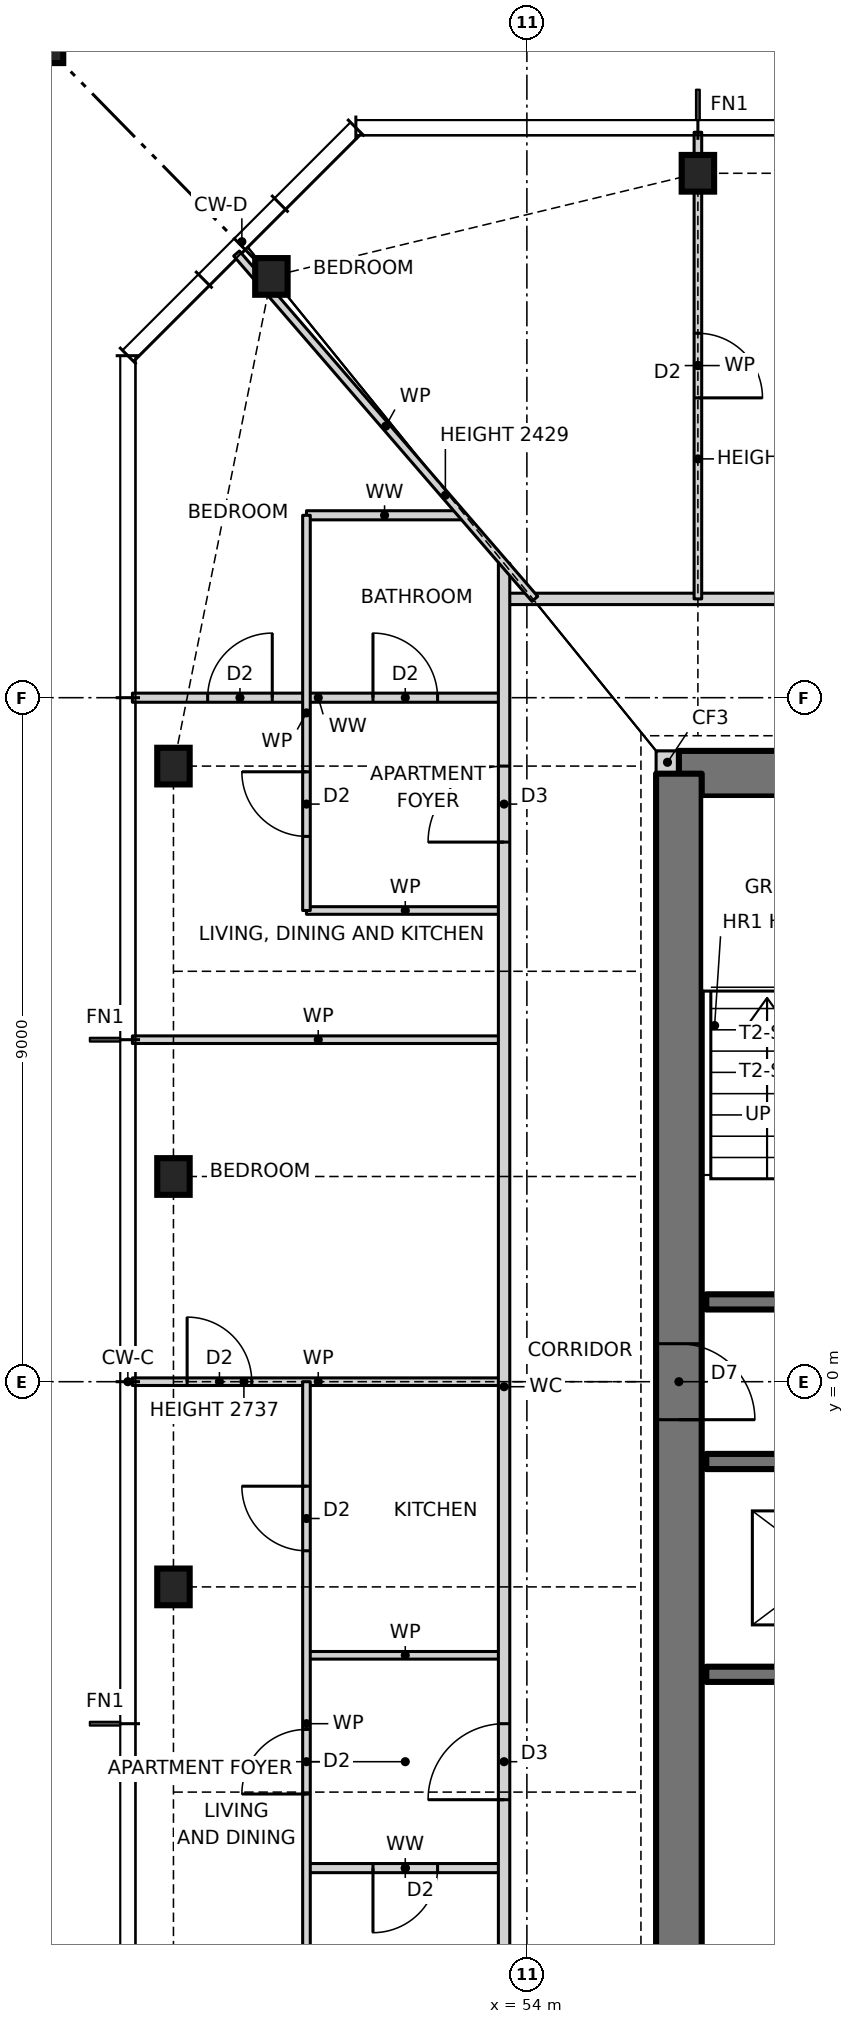
"""IFC4 building model, lengths in metres.
Left out: names, types, materials, properties, quantities, classifications, styles, units other than length and angle.
Written with IfcOpenShell. Run it as: python <this file> out.ifc"""

import sys

from ifc_helpers import new_model, si_unit, direction, frame, frame_2d, origin, origin_2d, place, context, subcontext, project, spatial, rectangle, hollow_rectangle, i_section, extrude, element, fill, save


model = new_model("IFC4")
c1 = context("Model", 3, precision=1e-05, world=origin(), true_north=direction((0.0, 1.0)))
c2 = subcontext(c1, "Body", "Model", "MODEL_VIEW")
j1 = project(units=[si_unit("LENGTHUNIT", "METRE"), si_unit("PLANEANGLEUNIT", "RADIAN")], contexts=[c1])
p1 = place(None, origin())
s1 = spatial("IfcSite", under=j1, at=p1, CompositionType="ELEMENT")
p2 = place(p1, origin())
s2 = spatial("IfcBuilding", under=s1, at=p2, CompositionType="ELEMENT")
p3 = place(p2, frame((0.0, 0.0, 84.0)))
s3 = spatial("IfcBuildingStorey", under=s2, at=p3, CompositionType="ELEMENT", Elevation=84.0)
for number, where, z_axis, x_axis in (
    (1, (56.25, 15.9, 0.0), (0.0, 0.0, 1.0), (1.0, 0.0, 0.0)),
    (2, (50.639, 14.543, 0.0), (0.0, 0.0, 1.0), (1.0, 0.0, 0.0)),
    (3, (49.35, 8.1, 0.0), (0.0, 0.0, 1.0), (1.0, 0.0, 0.0)),
    (4, (49.35, 2.7, 0.0), (0.0, 0.0, 1.0), (1.0, 0.0, 0.0)),
    (5, (49.35, -2.7, 0.0), (0.0, 0.0, 1.0), (1.0, 0.0, 0.0)),
):
    element("IfcColumn", number, at=place(p3, frame(where, z_axis=z_axis, x_axis=x_axis)), inside=s3, PredefinedType="COLUMN", context=c2, shape_type="SweptSolid", body=[
        extrude(i_section(OverallWidth=0.427, OverallDepth=0.483, WebThickness=0.051, FlangeThickness=0.082, at=origin_2d()), origin(), (0.0, 0.0, 1.0), 3.5),
    ])
p4 = place(p3, frame((47.35, 17.9, 0.0), z_axis=(0.0, 0.0, 1.0), x_axis=(1.0, 0.0, 0.0)))
e6 = element("IfcColumn", 6, at=p4, inside=s3, PredefinedType="COLUMN", context=c2, shape_type="SweptSolid", body=[
    extrude(hollow_rectangle(XDim=1.1, YDim=1.1, WallThickness=0.06, at=origin_2d()), origin(), (0.0, 0.0, 1.0), 3.5),
])
p5 = place(p3, frame((55.7, 8.15, 0.0), z_axis=(0.0, 0.0, 1.0), x_axis=(1.0, 0.0, 0.0)))
e7 = element("IfcWall", 7, at=p5, inside=s3, PredefinedType="SOLIDWALL", context=c2, shape_type="SweptSolid", body=[
    extrude(rectangle(XDim=0.3, YDim=0.3, at=frame_2d((0.15, 0.0))), origin(), (0.0, 0.0, 1.0), 3.5),
])
p6 = place(p3, frame((70.0, 8.0, 0.0), z_axis=(0.0, 0.0, 1.0), x_axis=(-1.0, 0.0, 0.0)))
e8 = element("IfcWall", 8, at=p6, inside=s3, PredefinedType="SHEAR", context=c2, shape_type="SweptSolid", body=[
    extrude(rectangle(XDim=14.0, YDim=0.6, at=frame_2d((7.0, 0.0))), origin(), (0.0, 0.0, 1.0), 3.5),
])
p7 = place(p6, frame((8.2, 0.0, 0.0)))
e9 = element("IfcOpeningElement", 9, at=p7, cuts=e8, PredefinedType="OPENING", context=c2, shape_type="SweptSolid", body=[
    extrude(rectangle(XDim=0.9, YDim=2.1, at=frame_2d((0.45, 1.05))), frame((0.0, 0.31, 0.0), z_axis=(0.0, -1.0, 0.0), x_axis=(1.0, 0.0, 0.0)), (0.0, 0.0, 1.0), 0.62),
])
p8 = place(p6, frame((3.2, 0.0, 0.0)))
e10 = element("IfcOpeningElement", 10, at=p8, cuts=e8, PredefinedType="OPENING", context=c2, shape_type="SweptSolid", body=[
    extrude(rectangle(XDim=0.9, YDim=2.1, at=frame_2d((0.45, 1.05))), frame((0.0, 0.31, 0.0), z_axis=(0.0, -1.0, 0.0), x_axis=(1.0, 0.0, 0.0)), (0.0, 0.0, 1.0), 0.62),
])
p9 = place(p3, frame((56.0, 8.0, 0.0), z_axis=(0.0, 0.0, 1.0), x_axis=(0.0, -1.0, 0.0)))
e11 = element("IfcWall", 11, at=p9, inside=s3, PredefinedType="SHEAR", context=c2, shape_type="SweptSolid", body=[
    extrude(rectangle(XDim=16.0, YDim=0.6, at=frame_2d((8.0, 0.0))), origin(), (0.0, 0.0, 1.0), 3.5),
])
p10 = place(p9, frame((7.5, 0.0, 0.0)))
e12 = element("IfcOpeningElement", 12, at=p10, cuts=e11, PredefinedType="OPENING", context=c2, shape_type="SweptSolid", body=[
    extrude(rectangle(XDim=1.0, YDim=2.1, at=frame_2d((0.5, 1.05))), frame((0.0, 0.31, 0.0), z_axis=(0.0, -1.0, 0.0), x_axis=(1.0, 0.0, 0.0)), (0.0, 0.0, 1.0), 0.62),
])
p11 = place(p3, frame((51.1, -6.4, 0.0), z_axis=(0.0, 0.0, 1.0), x_axis=(1.0, 0.0, 0.0)))
e13 = element("IfcWall", 13, at=p11, inside=s3, PredefinedType="PARTITIONING", context=c2, shape_type="SweptSolid", body=[
    extrude(rectangle(XDim=2.6, YDim=0.12, at=frame_2d((1.3, 0.0))), origin(), (0.0, 0.0, 1.0), 3.27),
])
p12 = place(p11, frame((0.875, 0.0, 0.0)))
e14 = element("IfcOpeningElement", 14, at=p12, cuts=e13, PredefinedType="OPENING", context=c2, shape_type="SweptSolid", body=[
    extrude(rectangle(XDim=0.85, YDim=2.1, at=frame_2d((0.425, 1.05))), frame((0.0, 0.07, 0.0), z_axis=(0.0, -1.0, 0.0), x_axis=(1.0, 0.0, 0.0)), (0.0, 0.0, 1.0), 0.14),
])
p13 = place(p3, frame((56.36, -3.85, 0.0), z_axis=(0.0, 0.0, 1.0), x_axis=(1.0, 0.0, 0.0)))
e15 = element("IfcWall", 15, at=p13, inside=s3, PredefinedType="SOLIDWALL", context=c2, shape_type="SweptSolid", body=[
    extrude(rectangle(XDim=9.94, YDim=0.2, at=frame_2d((4.97, 0.0))), origin(), (0.0, 0.0, 1.0), 3.5),
])
p14 = place(p3, frame((51.1, -3.6, 0.0), z_axis=(0.0, 0.0, 1.0), x_axis=(1.0, 0.0, 0.0)))
e16 = element("IfcWall", 16, at=p14, inside=s3, PredefinedType="PARTITIONING", context=c2, shape_type="SweptSolid", body=[
    extrude(rectangle(XDim=2.6, YDim=0.1, at=frame_2d((1.3, 0.0))), origin(), (0.0, 0.0, 1.0), 3.27),
])
p15 = place(p3, frame((56.36, -1.05, 0.0), z_axis=(0.0, 0.0, 1.0), x_axis=(1.0, 0.0, 0.0)))
e17 = element("IfcWall", 17, at=p15, inside=s3, PredefinedType="SOLIDWALL", context=c2, shape_type="SweptSolid", body=[
    extrude(rectangle(XDim=13.28, YDim=0.2, at=frame_2d((6.64, 0.0))), origin(), (0.0, 0.0, 1.0), 3.5),
])
p16 = place(p15, frame((11.11, 0.0, 0.0)))
e18 = element("IfcOpeningElement", 18, at=p16, cuts=e17, PredefinedType="OPENING", context=c2, shape_type="SweptSolid", body=[
    extrude(rectangle(XDim=1.0, YDim=2.1, at=frame_2d((0.5, 1.05))), frame((0.0, 0.11, 0.0), z_axis=(0.0, -1.0, 0.0), x_axis=(1.0, 0.0, 0.0)), (0.0, 0.0, 1.0), 0.22),
])
p17 = place(p15, frame((1.087, 0.0, 0.0)))
e19 = element("IfcOpeningElement", 19, at=p17, cuts=e17, PredefinedType="OPENING", context=c2, shape_type="SweptSolid", body=[
    extrude(rectangle(XDim=1.1, YDim=2.1, at=frame_2d((0.55, 1.05))), frame((0.0, 0.11, 0.0), z_axis=(0.0, -1.0, 0.0), x_axis=(1.0, 0.0, 0.0)), (0.0, 0.0, 1.0), 0.22),
])
p18 = place(p15, frame((4.39, 0.0, 0.0)))
e20 = element("IfcOpeningElement", 20, at=p18, cuts=e17, PredefinedType="OPENING", context=c2, shape_type="SweptSolid", body=[
    extrude(rectangle(XDim=1.1, YDim=2.1, at=frame_2d((0.55, 1.05))), frame((0.0, 0.11, 0.0), z_axis=(0.0, -1.0, 0.0), x_axis=(1.0, 0.0, 0.0)), (0.0, 0.0, 1.0), 0.22),
])
p19 = place(p15, frame((7.724, 0.0, 0.0)))
e21 = element("IfcOpeningElement", 21, at=p19, cuts=e17, PredefinedType="OPENING", context=c2, shape_type="SweptSolid", body=[
    extrude(rectangle(XDim=1.1, YDim=2.1, at=frame_2d((0.55, 1.05))), frame((0.0, 0.11, 0.0), z_axis=(0.0, -1.0, 0.0), x_axis=(1.0, 0.0, 0.0)), (0.0, 0.0, 1.0), 0.22),
])
p20 = place(p3, frame((48.81, 0.0, 0.0), z_axis=(0.0, 0.0, 1.0), x_axis=(1.0, 0.0, 0.0)))
e22 = element("IfcWall", 22, at=p20, inside=s3, PredefinedType="PARTITIONING", context=c2, shape_type="SweptSolid", body=[
    extrude(rectangle(XDim=4.89, YDim=0.1, at=frame_2d((2.445, 0.0))), origin(), (0.0, 0.0, 1.0), 2.737),
])
p21 = place(p20, frame((0.72, 0.0, 0.0)))
e23 = element("IfcOpeningElement", 23, at=p21, cuts=e22, PredefinedType="OPENING", context=c2, shape_type="SweptSolid", body=[
    extrude(rectangle(XDim=0.85, YDim=2.1, at=frame_2d((0.425, 1.05))), frame((0.0, 0.06, 0.0), z_axis=(0.0, -1.0, 0.0), x_axis=(1.0, 0.0, 0.0)), (0.0, 0.0, 1.0), 0.12),
])
p22 = place(p3, frame((56.36, 1.05, 0.0), z_axis=(0.0, 0.0, 1.0), x_axis=(1.0, 0.0, 0.0)))
e24 = element("IfcWall", 24, at=p22, inside=s3, PredefinedType="SOLIDWALL", context=c2, shape_type="SweptSolid", body=[
    extrude(rectangle(XDim=13.28, YDim=0.2, at=frame_2d((6.64, 0.0))), origin(), (0.0, 0.0, 1.0), 3.5),
])
p23 = place(p22, frame((1.17, 0.0, 0.0)))
e25 = element("IfcOpeningElement", 25, at=p23, cuts=e24, PredefinedType="OPENING", context=c2, shape_type="SweptSolid", body=[
    extrude(rectangle(XDim=1.0, YDim=2.1, at=frame_2d((0.5, 1.05))), frame((0.0, 0.11, 0.0), z_axis=(0.0, -1.0, 0.0), x_axis=(1.0, 0.0, 0.0)), (0.0, 0.0, 1.0), 0.22),
])
p24 = place(p22, frame((7.54, 0.0, 0.0)))
e26 = element("IfcOpeningElement", 26, at=p24, cuts=e24, PredefinedType="OPENING", context=c2, shape_type="SweptSolid", body=[
    extrude(rectangle(XDim=0.9, YDim=2.1, at=frame_2d((0.45, 1.05))), frame((0.0, 0.11, 0.0), z_axis=(0.0, -1.0, 0.0), x_axis=(1.0, 0.0, 0.0)), (0.0, 0.0, 1.0), 0.22),
])
p25 = place(p22, frame((4.24, 0.0, 0.0)))
e27 = element("IfcOpeningElement", 27, at=p25, cuts=e24, PredefinedType="OPENING", context=c2, shape_type="SweptSolid", body=[
    extrude(rectangle(XDim=0.9, YDim=2.1, at=frame_2d((0.45, 1.05))), frame((0.0, 0.11, 0.0), z_axis=(0.0, -1.0, 0.0), x_axis=(1.0, 0.0, 0.0)), (0.0, 0.0, 1.0), 0.22),
])
p26 = place(p22, frame((10.96, 0.0, 0.0)))
e28 = element("IfcOpeningElement", 28, at=p26, cuts=e24, PredefinedType="OPENING", context=c2, shape_type="SweptSolid", body=[
    extrude(rectangle(XDim=1.3, YDim=2.1, at=frame_2d((0.65, 1.05))), frame((0.0, 0.11, 0.0), z_axis=(0.0, -1.0, 0.0), x_axis=(1.0, 0.0, 0.0)), (0.0, 0.0, 1.0), 0.22),
])
p27 = place(p3, frame((48.81, 4.5, 0.0), z_axis=(0.0, 0.0, 1.0), x_axis=(1.0, 0.0, 0.0)))
e29 = element("IfcWall", 29, at=p27, inside=s3, PredefinedType="PARTITIONING", context=c2, shape_type="SweptSolid", body=[
    extrude(rectangle(XDim=4.89, YDim=0.1, at=frame_2d((2.445, 0.0))), origin(), (0.0, 0.0, 1.0), 3.27),
])
p28 = place(p3, frame((51.1, 6.2, 0.0), z_axis=(0.0, 0.0, 1.0), x_axis=(1.0, 0.0, 0.0)))
e30 = element("IfcWall", 30, at=p28, inside=s3, PredefinedType="PARTITIONING", context=c2, shape_type="SweptSolid", body=[
    extrude(rectangle(XDim=2.6, YDim=0.1, at=frame_2d((1.3, 0.0))), origin(), (0.0, 0.0, 1.0), 3.27),
])
p29 = place(p3, frame((48.81, 9.0, 0.0), z_axis=(0.0, 0.0, 1.0), x_axis=(1.0, 0.0, 0.0)))
e31 = element("IfcWall", 31, at=p29, inside=s3, PredefinedType="PARTITIONING", context=c2, shape_type="SweptSolid", body=[
    extrude(rectangle(XDim=4.89, YDim=0.12, at=frame_2d((2.445, 0.0))), origin(), (0.0, 0.0, 1.0), 3.27),
])
p30 = place(p29, frame((3.165, 0.0, 0.0)))
e32 = element("IfcOpeningElement", 32, at=p30, cuts=e31, PredefinedType="OPENING", context=c2, shape_type="SweptSolid", body=[
    extrude(rectangle(XDim=0.85, YDim=2.1, at=frame_2d((0.425, 1.05))), frame((0.0, 0.07, 0.0), z_axis=(0.0, -1.0, 0.0), x_axis=(1.0, 0.0, 0.0)), (0.0, 0.0, 1.0), 0.14),
])
p31 = place(p29, frame((0.99, 0.0, 0.0)))
e33 = element("IfcOpeningElement", 33, at=p31, cuts=e31, PredefinedType="OPENING", context=c2, shape_type="SweptSolid", body=[
    extrude(rectangle(XDim=0.85, YDim=2.1, at=frame_2d((0.425, 1.05))), frame((0.0, 0.07, 0.0), z_axis=(0.0, -1.0, 0.0), x_axis=(1.0, 0.0, 0.0)), (0.0, 0.0, 1.0), 0.14),
])
p32 = place(p3, frame((53.7, 10.3, 0.0), z_axis=(0.0, 0.0, 1.0), x_axis=(1.0, 0.0, 0.0)))
e34 = element("IfcWall", 34, at=p32, inside=s3, PredefinedType="PARTITIONING", context=c2, shape_type="SweptSolid", body=[
    extrude(rectangle(XDim=18.6, YDim=0.15, at=frame_2d((9.3, 0.0))), origin(), (0.0, 0.0, 1.0), 3.27),
])
p33 = place(p32, frame((8.8, 0.0, 0.0)))
e35 = element("IfcOpeningElement", 35, at=p33, cuts=e34, PredefinedType="OPENING", context=c2, shape_type="SweptSolid", body=[
    extrude(rectangle(XDim=1.0, YDim=2.1, at=frame_2d((0.5, 1.05))), frame((0.0, 0.085, 0.0), z_axis=(0.0, -1.0, 0.0), x_axis=(1.0, 0.0, 0.0)), (0.0, 0.0, 1.0), 0.17),
])
p34 = place(p3, frame((51.1, 11.4, 0.0), z_axis=(0.0, 0.0, 1.0), x_axis=(1.0, 0.0, 0.0)))
e36 = element("IfcWall", 36, at=p34, inside=s3, PredefinedType="PARTITIONING", context=c2, shape_type="SweptSolid", body=[
    extrude(rectangle(XDim=2.055, YDim=0.12, at=frame_2d((1.027, 0.0))), origin(), (0.0, 0.0, 1.0), 3.27),
])
p35 = place(p3, frame((56.25, 10.3, 0.0), z_axis=(0.0, 0.0, 1.0), x_axis=(0.0, 1.0, 0.0)))
e37 = element("IfcWall", 37, at=p35, inside=s3, PredefinedType="PARTITIONING", context=c2, shape_type="SweptSolid", body=[
    extrude(rectangle(XDim=6.14, YDim=0.1, at=frame_2d((3.07, 0.0))), origin(), (0.0, 0.0, 1.0), 2.587),
])
p36 = place(p35, frame((2.645, 0.0, 0.0)))
e38 = element("IfcOpeningElement", 38, at=p36, cuts=e37, PredefinedType="OPENING", context=c2, shape_type="SweptSolid", body=[
    extrude(rectangle(XDim=0.85, YDim=2.1, at=frame_2d((0.425, 1.05))), frame((0.0, 0.06, 0.0), z_axis=(0.0, -1.0, 0.0), x_axis=(1.0, 0.0, 0.0)), (0.0, 0.0, 1.0), 0.12),
])
p37 = place(p3, frame((53.7, -10.9, 0.0), z_axis=(0.0, 0.0, 1.0), x_axis=(0.0, 1.0, 0.0)))
e39 = element("IfcWall", 39, at=p37, inside=s3, PredefinedType="PARTITIONING", context=c2, shape_type="SweptSolid", body=[
    extrude(rectangle(XDim=21.668, YDim=0.15, at=frame_2d((10.834, 0.0))), origin(), (0.0, 0.0, 1.0), 3.27),
])
p38 = place(p37, frame((18.0, 0.0, 0.0)))
e40 = element("IfcOpeningElement", 40, at=p38, cuts=e39, PredefinedType="OPENING", context=c2, shape_type="SweptSolid", body=[
    extrude(rectangle(XDim=1.0, YDim=2.1, at=frame_2d((0.5, 1.05))), frame((0.0, 0.085, 0.0), z_axis=(0.0, -1.0, 0.0), x_axis=(1.0, 0.0, 0.0)), (0.0, 0.0, 1.0), 0.17),
])
p39 = place(p37, frame((5.4, 0.0, 0.0)))
e41 = element("IfcOpeningElement", 41, at=p39, cuts=e39, PredefinedType="OPENING", context=c2, shape_type="SweptSolid", body=[
    extrude(rectangle(XDim=1.0, YDim=2.1, at=frame_2d((0.5, 1.05))), frame((0.0, 0.085, 0.0), z_axis=(0.0, -1.0, 0.0), x_axis=(1.0, 0.0, 0.0)), (0.0, 0.0, 1.0), 0.17),
])
p40 = place(p3, frame((51.1, -9.0, 0.0), z_axis=(0.0, 0.0, 1.0), x_axis=(0.0, 1.0, 0.0)))
e42 = element("IfcWall", 42, at=p40, inside=s3, PredefinedType="PARTITIONING", context=c2, shape_type="SweptSolid", body=[
    extrude(rectangle(XDim=9.0, YDim=0.1, at=frame_2d((4.5, 0.0))), origin(), (0.0, 0.0, 1.0), 3.27),
])
p41 = place(p40, frame((6.775, 0.0, 0.0)))
e43 = element("IfcOpeningElement", 43, at=p41, cuts=e42, PredefinedType="OPENING", context=c2, shape_type="SweptSolid", body=[
    extrude(rectangle(XDim=0.85, YDim=2.1, at=frame_2d((0.425, 1.05))), frame((0.0, 0.06, 0.0), z_axis=(0.0, -1.0, 0.0), x_axis=(1.0, 0.0, 0.0)), (0.0, 0.0, 1.0), 0.12),
])
p42 = place(p40, frame((3.575, 0.0, 0.0)))
e44 = element("IfcOpeningElement", 44, at=p42, cuts=e42, PredefinedType="OPENING", context=c2, shape_type="SweptSolid", body=[
    extrude(rectangle(XDim=0.85, YDim=2.1, at=frame_2d((0.425, 1.05))), frame((0.0, 0.06, 0.0), z_axis=(0.0, -1.0, 0.0), x_axis=(1.0, 0.0, 0.0)), (0.0, 0.0, 1.0), 0.12),
])
p43 = place(p3, frame((51.1, 6.2, 0.0), z_axis=(0.0, 0.0, 1.0), x_axis=(0.0, 1.0, 0.0)))
e45 = element("IfcWall", 45, at=p43, inside=s3, PredefinedType="PARTITIONING", context=c2, shape_type="SweptSolid", body=[
    extrude(rectangle(XDim=5.2, YDim=0.1, at=frame_2d((2.6, 0.0))), origin(), (0.0, 0.0, 1.0), 3.27),
])
p44 = place(p43, frame((0.975, 0.0, 0.0)))
e46 = element("IfcOpeningElement", 46, at=p44, cuts=e45, PredefinedType="OPENING", context=c2, shape_type="SweptSolid", body=[
    extrude(rectangle(XDim=0.85, YDim=2.1, at=frame_2d((0.425, 1.05))), frame((0.0, 0.06, 0.0), z_axis=(0.0, -1.0, 0.0), x_axis=(1.0, 0.0, 0.0)), (0.0, 0.0, 1.0), 0.12),
])
p45 = place(p3, frame((54.105, 10.3, 0.0), z_axis=(0.0, 0.0, 1.0), x_axis=(-0.653606109319, 0.756834892074, 0.0)))
e47 = element("IfcWall", 47, at=p45, inside=s3, PredefinedType="PARTITIONING", context=c2, shape_type="SweptSolid", body=[
    extrude(rectangle(XDim=6.005, YDim=0.1, at=frame_2d((3.002, 0.0))), origin(), (0.0, 0.0, 1.0), 2.429),
])
p46 = place(p36, frame((0.85, 0.0, 0.0), z_axis=(0.0, 0.0, 1.0), x_axis=(-1.0, 0.0, 0.0)))
e48 = element("IfcDoor", 48, at=p46, inside=s3, OperationType="SINGLE_SWING_RIGHT", PredefinedType="DOOR", context=c2, shape_type="SweptSolid", body=[
    extrude(rectangle(XDim=0.85, YDim=2.1, at=frame_2d((0.425, 1.05))), frame((0.0, 0.025, 0.0), z_axis=(0.0, -1.0, 0.0), x_axis=(1.0, 0.0, 0.0)), (0.0, 0.0, 1.0), 0.05),
])
fill(e38, e48)
p47 = place(p38, origin())
e49 = element("IfcDoor", 49, at=p47, inside=s3, OperationType="SINGLE_SWING_LEFT", PredefinedType="DOOR", context=c2, shape_type="SweptSolid", body=[
    extrude(rectangle(XDim=1.0, YDim=2.1, at=frame_2d((0.5, 1.05))), frame((0.0, 0.025, 0.0), z_axis=(0.0, -1.0, 0.0), x_axis=(1.0, 0.0, 0.0)), (0.0, 0.0, 1.0), 0.05),
])
fill(e40, e49)
p48 = place(p44, origin())
e50 = element("IfcDoor", 50, at=p48, inside=s3, OperationType="SINGLE_SWING_RIGHT", PredefinedType="DOOR", context=c2, shape_type="SweptSolid", body=[
    extrude(rectangle(XDim=0.85, YDim=2.1, at=frame_2d((0.425, 1.05))), frame((0.0, 0.025, 0.0), z_axis=(0.0, -1.0, 0.0), x_axis=(1.0, 0.0, 0.0)), (0.0, 0.0, 1.0), 0.05),
])
fill(e46, e50)
p49 = place(p30, origin())
e51 = element("IfcDoor", 51, at=p49, inside=s3, OperationType="SINGLE_SWING_LEFT", PredefinedType="DOOR", context=c2, shape_type="SweptSolid", body=[
    extrude(rectangle(XDim=0.85, YDim=2.1, at=frame_2d((0.425, 1.05))), frame((0.0, 0.025, 0.0), z_axis=(0.0, -1.0, 0.0), x_axis=(1.0, 0.0, 0.0)), (0.0, 0.0, 1.0), 0.05),
])
fill(e32, e51)
p50 = place(p31, origin())
e52 = element("IfcDoor", 52, at=p50, inside=s3, OperationType="SINGLE_SWING_RIGHT", PredefinedType="DOOR", context=c2, shape_type="SweptSolid", body=[
    extrude(rectangle(XDim=0.85, YDim=2.1, at=frame_2d((0.425, 1.05))), frame((0.0, 0.025, 0.0), z_axis=(0.0, -1.0, 0.0), x_axis=(1.0, 0.0, 0.0)), (0.0, 0.0, 1.0), 0.05),
])
fill(e33, e52)
p51 = place(p41, origin())
e53 = element("IfcDoor", 53, at=p51, inside=s3, OperationType="SINGLE_SWING_RIGHT", PredefinedType="DOOR", context=c2, shape_type="SweptSolid", body=[
    extrude(rectangle(XDim=0.85, YDim=2.1, at=frame_2d((0.425, 1.05))), frame((0.0, 0.025, 0.0), z_axis=(0.0, -1.0, 0.0), x_axis=(1.0, 0.0, 0.0)), (0.0, 0.0, 1.0), 0.05),
])
fill(e43, e53)
p52 = place(p39, origin())
e54 = element("IfcDoor", 54, at=p52, inside=s3, OperationType="SINGLE_SWING_LEFT", PredefinedType="DOOR", context=c2, shape_type="SweptSolid", body=[
    extrude(rectangle(XDim=1.0, YDim=2.1, at=frame_2d((0.5, 1.05))), frame((0.0, 0.025, 0.0), z_axis=(0.0, -1.0, 0.0), x_axis=(1.0, 0.0, 0.0)), (0.0, 0.0, 1.0), 0.05),
])
fill(e41, e54)
p53 = place(p42, origin())
e55 = element("IfcDoor", 55, at=p53, inside=s3, OperationType="SINGLE_SWING_LEFT", PredefinedType="DOOR", context=c2, shape_type="SweptSolid", body=[
    extrude(rectangle(XDim=0.85, YDim=2.1, at=frame_2d((0.425, 1.05))), frame((0.0, 0.025, 0.0), z_axis=(0.0, -1.0, 0.0), x_axis=(1.0, 0.0, 0.0)), (0.0, 0.0, 1.0), 0.05),
])
fill(e44, e55)
p54 = place(p12, frame((0.85, 0.0, 0.0), z_axis=(0.0, 0.0, 1.0), x_axis=(-1.0, 0.0, 0.0)))
e56 = element("IfcDoor", 56, at=p54, inside=s3, OperationType="SINGLE_SWING_RIGHT", PredefinedType="DOOR", context=c2, shape_type="SweptSolid", body=[
    extrude(rectangle(XDim=0.85, YDim=2.1, at=frame_2d((0.425, 1.05))), frame((0.0, 0.025, 0.0), z_axis=(0.0, -1.0, 0.0), x_axis=(1.0, 0.0, 0.0)), (0.0, 0.0, 1.0), 0.05),
])
fill(e14, e56)
p55 = place(p21, origin())
e57 = element("IfcDoor", 57, at=p55, inside=s3, OperationType="SINGLE_SWING_LEFT", PredefinedType="DOOR", context=c2, shape_type="SweptSolid", body=[
    extrude(rectangle(XDim=0.85, YDim=2.1, at=frame_2d((0.425, 1.05))), frame((0.0, 0.025, 0.0), z_axis=(0.0, -1.0, 0.0), x_axis=(1.0, 0.0, 0.0)), (0.0, 0.0, 1.0), 0.05),
])
fill(e23, e57)
p56 = place(p10, origin())
e58 = element("IfcDoor", 58, at=p56, inside=s3, OperationType="SINGLE_SWING_RIGHT", PredefinedType="DOOR", context=c2, shape_type="SweptSolid", body=[
    extrude(rectangle(XDim=1.0, YDim=2.1, at=frame_2d((0.5, 1.05))), frame((0.0, 0.025, 0.0), z_axis=(0.0, -1.0, 0.0), x_axis=(1.0, 0.0, 0.0)), (0.0, 0.0, 1.0), 0.05),
])
fill(e12, e58)
save(model, sys.argv[1])
